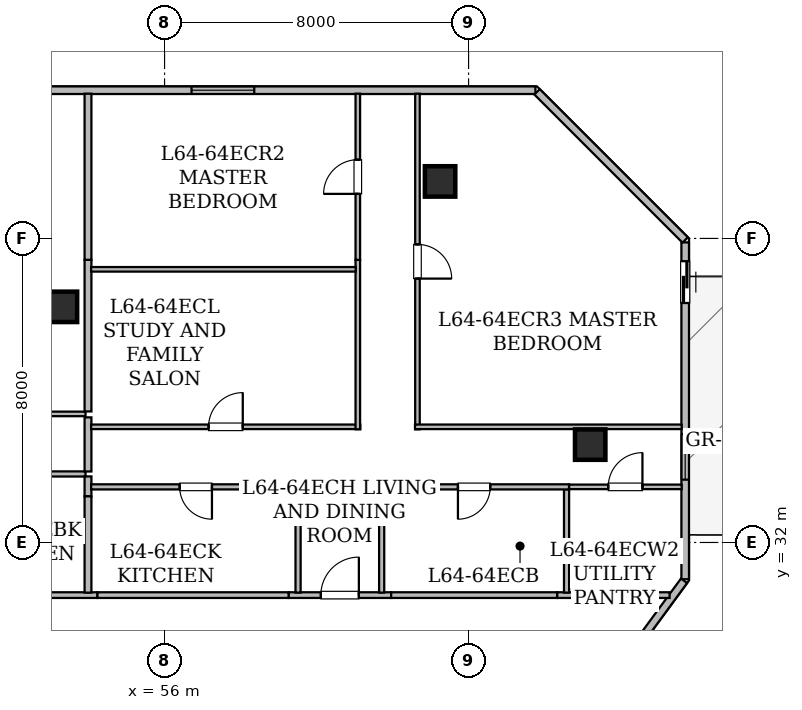
"""IFC4 building model, lengths in metres.
Left out: names, types, materials, properties, quantities, classifications, styles, units other than length and angle.
Written with IfcOpenShell. Run it as: python <this file> out.ifc"""

import sys

from ifc_helpers import new_model, si_unit, direction, frame, frame_2d, origin, origin_2d, place, context, subcontext, project, spatial, rectangle, hollow_rectangle, extrude, element, fill, save


model = new_model("IFC4")
c1 = context("Model", 3, precision=1e-05, world=origin(), true_north=direction((0.0, 1.0)))
c2 = subcontext(c1, "Body", "Model", "MODEL_VIEW")
j1 = project(units=[si_unit("LENGTHUNIT", "METRE"), si_unit("PLANEANGLEUNIT", "RADIAN")], contexts=[c1])
p1 = place(None, origin())
s1 = spatial("IfcSite", under=j1, at=p1, CompositionType="ELEMENT")
p2 = place(p1, origin())
s2 = spatial("IfcBuilding", under=s1, at=p2, CompositionType="ELEMENT")
p3 = place(p2, frame((0.0, 0.0, 250.05)))
s3 = spatial("IfcBuildingStorey", under=s2, at=p3, CompositionType="ELEMENT", Elevation=250.05)
for number, where, z_axis, x_axis in (
    (1, (63.25, 41.5, 0.0), (0.0, 0.0, 1.0), (1.0, 0.0, 0.0)),
    (2, (67.2, 34.575, 0.0), (0.0, 0.0, 1.0), (1.0, 0.0, 0.0)),
    (3, (53.3, 38.2, 0.0), (0.0, 0.0, 1.0), (1.0, 0.0, 0.0)),
):
    element("IfcColumn", number, at=place(p3, frame(where, z_axis=z_axis, x_axis=x_axis)), inside=s3, PredefinedType="COLUMN", context=c2, shape_type="SweptSolid", body=[
        extrude(hollow_rectangle(XDim=0.8, YDim=0.8, WallThickness=0.04, at=origin_2d()), origin(), (0.0, 0.0, 1.0), 3.65),
    ])
p4 = place(p3, frame((24.302, 43.9, 0.0), z_axis=(0.0, 0.0, 1.0), x_axis=(1.0, 0.0, 0.0)))
e4 = element("IfcWall", 4, at=p4, inside=s3, PredefinedType="STANDARD", context=c2, shape_type="SweptSolid", body=[
    extrude(rectangle(XDim=41.457, YDim=0.2, at=frame_2d((20.729, 0.0))), origin(), (0.0, 0.0, 1.0), 3.43),
])
p5 = place(p4, frame((0.604, 0.0, 0.85)))
e5 = element("IfcOpeningElement", 5, at=p5, cuts=e4, PredefinedType="OPENING", context=c2, shape_type="SweptSolid", body=[
    extrude(rectangle(XDim=1.65, YDim=1.55, at=frame_2d((0.825, 0.775))), frame((0.0, 0.11, 0.0), z_axis=(0.0, -1.0, 0.0), x_axis=(1.0, 0.0, 0.0)), (0.0, 0.0, 1.0), 0.22),
])
p6 = place(p4, frame((9.098, 0.0, 0.85)))
e6 = element("IfcOpeningElement", 6, at=p6, cuts=e4, PredefinedType="OPENING", context=c2, shape_type="SweptSolid", body=[
    extrude(rectangle(XDim=1.65, YDim=1.55, at=frame_2d((0.825, 0.775))), frame((0.0, 0.11, 0.0), z_axis=(0.0, -1.0, 0.0), x_axis=(1.0, 0.0, 0.0)), (0.0, 0.0, 1.0), 0.22),
])
p7 = place(p4, frame((14.405, 0.0, 0.85)))
e7 = element("IfcOpeningElement", 7, at=p7, cuts=e4, PredefinedType="OPENING", context=c2, shape_type="SweptSolid", body=[
    extrude(rectangle(XDim=1.65, YDim=1.55, at=frame_2d((0.825, 0.775))), frame((0.0, 0.11, 0.0), z_axis=(0.0, -1.0, 0.0), x_axis=(1.0, 0.0, 0.0)), (0.0, 0.0, 1.0), 0.22),
])
p8 = place(p4, frame((22.898, 0.0, 0.8)))
e8 = element("IfcOpeningElement", 8, at=p8, cuts=e4, PredefinedType="OPENING", context=c2, shape_type="SweptSolid", body=[
    extrude(rectangle(XDim=1.2, YDim=1.5, at=frame_2d((0.6, 0.75))), frame((0.0, 0.11, 0.0), z_axis=(0.0, -1.0, 0.0), x_axis=(1.0, 0.0, 0.0)), (0.0, 0.0, 1.0), 0.22),
])
p9 = place(p4, frame((19.188, 0.0, 0.85)))
e9 = element("IfcOpeningElement", 9, at=p9, cuts=e4, PredefinedType="OPENING", context=c2, shape_type="SweptSolid", body=[
    extrude(rectangle(XDim=1.65, YDim=1.55, at=frame_2d((0.825, 0.775))), frame((0.0, 0.11, 0.0), z_axis=(0.0, -1.0, 0.0), x_axis=(1.0, 0.0, 0.0)), (0.0, 0.0, 1.0), 0.22),
])
p10 = place(p4, frame((26.158, 0.0, 0.85)))
e10 = element("IfcOpeningElement", 10, at=p10, cuts=e4, PredefinedType="OPENING", context=c2, shape_type="SweptSolid", body=[
    extrude(rectangle(XDim=1.65, YDim=1.55, at=frame_2d((0.825, 0.775))), frame((0.0, 0.11, 0.0), z_axis=(0.0, -1.0, 0.0), x_axis=(1.0, 0.0, 0.0)), (0.0, 0.0, 1.0), 0.22),
])
p11 = place(p4, frame((32.408, 0.0, 0.85)))
e11 = element("IfcOpeningElement", 11, at=p11, cuts=e4, PredefinedType="OPENING", context=c2, shape_type="SweptSolid", body=[
    extrude(rectangle(XDim=1.65, YDim=1.55, at=frame_2d((0.825, 0.775))), frame((0.0, 0.11, 0.0), z_axis=(0.0, -1.0, 0.0), x_axis=(1.0, 0.0, 0.0)), (0.0, 0.0, 1.0), 0.22),
])
p12 = place(p3, frame((65.802, 43.857, 0.0), z_axis=(0.0, 0.0, 1.0), x_axis=(0.707106781187, -0.707106781187, 0.0)))
e12 = element("IfcWall", 12, at=p12, inside=s3, PredefinedType="STANDARD", context=c2, shape_type="SweptSolid", body=[
    extrude(rectangle(XDim=5.512, YDim=0.2, at=frame_2d((2.756, 0.0))), origin(), (0.0, 0.0, 1.0), 3.43),
])
p13 = place(p3, frame((69.7, 39.896, 0.0), z_axis=(0.0, 0.0, 1.0), x_axis=(0.0, -1.0, 0.0)))
e13 = element("IfcWall", 13, at=p13, inside=s3, PredefinedType="STANDARD", context=c2, shape_type="SweptSolid", body=[
    extrude(rectangle(XDim=8.863, YDim=0.2, at=frame_2d((4.432, 0.0))), origin(), (0.0, 0.0, 1.0), 3.43),
])
p14 = place(p13, frame((0.495, 0.0, 0.0)))
e14 = element("IfcOpeningElement", 14, at=p14, cuts=e13, PredefinedType="OPENING", context=c2, shape_type="SweptSolid", body=[
    extrude(rectangle(XDim=1.1, YDim=2.2, at=frame_2d((0.55, 1.1))), frame((0.0, 0.11, 0.0), z_axis=(0.0, -1.0, 0.0), x_axis=(1.0, 0.0, 0.0)), (0.0, 0.0, 1.0), 0.22),
])
p15 = place(p13, frame((5.043, 0.0, 0.8)))
e15 = element("IfcOpeningElement", 15, at=p15, cuts=e13, PredefinedType="OPENING", context=c2, shape_type="SweptSolid", body=[
    extrude(rectangle(XDim=1.2, YDim=1.5, at=frame_2d((0.6, 0.75))), frame((0.0, 0.11, 0.0), z_axis=(0.0, -1.0, 0.0), x_axis=(1.0, 0.0, 0.0)), (0.0, 0.0, 1.0), 0.22),
])
p16 = place(p3, frame((69.67, 30.992, 0.0), z_axis=(0.0, 0.0, 1.0), x_axis=(-0.591320870733, -0.806436375566, 0.0)))
e16 = element("IfcWall", 16, at=p16, inside=s3, PredefinedType="STANDARD", context=c2, shape_type="SweptSolid", body=[
    extrude(rectangle(XDim=3.71, YDim=0.2, at=frame_2d((1.855, 0.0))), origin(), (0.0, 0.0, 1.0), 3.43),
])
p17 = place(p3, frame((49.149, 30.615, 0.0), z_axis=(0.0, 0.0, 1.0), x_axis=(1.0, 0.0, 0.0)))
e17 = element("IfcWall", 17, at=p17, inside=s3, PredefinedType="STANDARD", context=c2, shape_type="SweptSolid", body=[
    extrude(rectangle(XDim=5.085, YDim=0.15, at=frame_2d((2.542, 0.0))), origin(), (0.0, 0.0, 1.0), 2.725),
])
p18 = place(p3, frame((66.329, 30.615, 0.0), z_axis=(0.0, 0.0, 1.0), x_axis=(1.0, 0.0, 0.0)))
e18 = element("IfcWall", 18, at=p18, inside=s3, PredefinedType="STANDARD", context=c2, shape_type="SweptSolid", body=[
    extrude(rectangle(XDim=2.961, YDim=0.15, at=frame_2d((1.48, 0.0))), origin(), (0.0, 0.0, 1.0), 2.887),
])
p19 = place(p3, frame((59.264, 30.615, 0.0), z_axis=(0.0, 0.0, 1.0), x_axis=(1.0, 0.0, 0.0)))
e19 = element("IfcWall", 19, at=p19, inside=s3, PredefinedType="STANDARD", context=c2, shape_type="SweptSolid", body=[
    extrude(rectangle(XDim=2.698, YDim=0.15, at=frame_2d((1.349, 0.0))), origin(), (0.0, 0.0, 1.0), 3.43),
])
p20 = place(p19, frame((0.849, 0.0, 0.0)))
e20 = element("IfcOpeningElement", 20, at=p20, cuts=e19, PredefinedType="OPENING", context=c2, shape_type="SweptSolid", body=[
    extrude(rectangle(XDim=1.0, YDim=2.15, at=frame_2d((0.5, 1.075))), frame((0.0, 0.085, 0.0), z_axis=(0.0, -1.0, 0.0), x_axis=(1.0, 0.0, 0.0)), (0.0, 0.0, 1.0), 0.17),
])
p21 = place(p3, frame((61.962, 30.615, 0.0), z_axis=(0.0, 0.0, 1.0), x_axis=(1.0, 0.0, 0.0)))
e21 = element("IfcWall", 21, at=p21, inside=s3, PredefinedType="STANDARD", context=c2, shape_type="SweptSolid", body=[
    extrude(rectangle(XDim=4.367, YDim=0.15, at=frame_2d((2.184, 0.0))), origin(), (0.0, 0.0, 1.0), 3.43),
])
p22 = place(p3, frame((54.234, 30.615, 0.0), z_axis=(0.0, 0.0, 1.0), x_axis=(1.0, 0.0, 0.0)))
e22 = element("IfcWall", 22, at=p22, inside=s3, PredefinedType="STANDARD", context=c2, shape_type="SweptSolid", body=[
    extrude(rectangle(XDim=5.03, YDim=0.15, at=frame_2d((2.515, 0.0))), origin(), (0.0, 0.0, 1.0), 3.43),
])
p23 = place(p3, frame((53.92, 33.803, 0.0), z_axis=(0.0, 0.0, 1.0), x_axis=(-1.0, 0.0, 0.0)))
e23 = element("IfcWall", 23, at=p23, inside=s3, PredefinedType="PARTITIONING", context=c2, shape_type="SweptSolid", body=[
    extrude(rectangle(XDim=5.085, YDim=0.135, at=frame_2d((2.542, 0.0))), origin(), (0.0, 0.0, 1.0), 2.725),
])
p24 = place(p23, frame((2.118, 0.0, 0.0)))
e24 = element("IfcOpeningElement", 24, at=p24, cuts=e23, PredefinedType="OPENING", context=c2, shape_type="SweptSolid", body=[
    extrude(rectangle(XDim=0.85, YDim=2.1, at=frame_2d((0.425, 1.05))), frame((0.0, 0.077, 0.0), z_axis=(0.0, -1.0, 0.0), x_axis=(1.0, 0.0, 0.0)), (0.0, 0.0, 1.0), 0.155),
])
p25 = place(p3, frame((48.52, 35.383, 0.0), z_axis=(0.0, 0.0, 1.0), x_axis=(1.0, 0.0, 0.0)))
e25 = element("IfcWall", 25, at=p25, inside=s3, PredefinedType="PARTITIONING", context=c2, shape_type="SweptSolid", body=[
    extrude(rectangle(XDim=5.4, YDim=0.12, at=frame_2d((2.7, 0.0))), origin(), (0.0, 0.0, 1.0), 2.725),
])
p26 = place(p3, frame((53.985, 35.292, 0.0), z_axis=(0.0, 0.0, 1.0), x_axis=(0.0, -1.0, 0.0)))
e26 = element("IfcWall", 26, at=p26, inside=s3, PredefinedType="STANDARD", context=c2, shape_type="SweptSolid", body=[
    extrude(rectangle(XDim=1.424, YDim=0.18, at=frame_2d((0.712, 0.0))), origin(), (0.0, 0.0, 1.0), 3.43),
])
p27 = place(p3, frame((53.985, 33.738, 0.0), z_axis=(0.0, 0.0, 1.0), x_axis=(0.0, -1.0, 0.0)))
e27 = element("IfcWall", 27, at=p27, inside=s3, PredefinedType="STANDARD", context=c2, shape_type="SweptSolid", body=[
    extrude(rectangle(XDim=0.524, YDim=0.18, at=frame_2d((0.262, 0.0))), origin(), (0.0, 0.0, 1.0), 2.961),
])
p28 = place(p3, frame((53.985, 33.214, 0.0), z_axis=(0.0, 0.0, 1.0), x_axis=(0.0, -1.0, 0.0)))
e28 = element("IfcWall", 28, at=p28, inside=s3, PredefinedType="STANDARD", context=c2, shape_type="SweptSolid", body=[
    extrude(rectangle(XDim=2.534, YDim=0.18, at=frame_2d((1.267, 0.0))), origin(), (0.0, 0.0, 1.0), 3.43),
])
p29 = place(p3, frame((53.985, 39.436, 0.0), z_axis=(0.0, 0.0, 1.0), x_axis=(0.0, -1.0, 0.0)))
e29 = element("IfcWall", 29, at=p29, inside=s3, PredefinedType="STANDARD", context=c2, shape_type="SweptSolid", body=[
    extrude(rectangle(XDim=3.988, YDim=0.18, at=frame_2d((1.994, 0.0))), origin(), (0.0, 0.0, 1.0), 2.725),
])
p30 = place(p3, frame((53.985, 43.808, 0.0), z_axis=(0.0, 0.0, 1.0), x_axis=(0.0, -1.0, 0.0)))
e30 = element("IfcWall", 30, at=p30, inside=s3, PredefinedType="STANDARD", context=c2, shape_type="SweptSolid", body=[
    extrude(rectangle(XDim=4.372, YDim=0.18, at=frame_2d((2.186, 0.0))), origin(), (0.0, 0.0, 1.0), 2.887),
])
p31 = place(p3, frame((66.643, 33.463, 0.0), z_axis=(0.0, 0.0, 1.0), x_axis=(1.0, 0.0, 0.0)))
e31 = element("IfcWall", 31, at=p31, inside=s3, PredefinedType="PARTITIONING", context=c2, shape_type="SweptSolid", body=[
    extrude(rectangle(XDim=2.965, YDim=0.12, at=frame_2d((1.482, 0.0))), origin(), (0.0, 0.0, 1.0), 2.887),
])
p32 = place(p31, frame((1.032, 0.0, 0.0)))
e32 = element("IfcOpeningElement", 32, at=p32, cuts=e31, PredefinedType="OPENING", context=c2, shape_type="SweptSolid", body=[
    extrude(rectangle(XDim=0.9, YDim=2.1, at=frame_2d((0.45, 1.05))), frame((0.0, 0.07, 0.0), z_axis=(0.0, -1.0, 0.0), x_axis=(1.0, 0.0, 0.0)), (0.0, 0.0, 1.0), 0.14),
])
p33 = place(p3, frame((66.578, 30.68, 0.0), z_axis=(0.0, 0.0, 1.0), x_axis=(0.0, 1.0, 0.0)))
e33 = element("IfcWall", 33, at=p33, inside=s3, PredefinedType="PARTITIONING", context=c2, shape_type="SweptSolid", body=[
    extrude(rectangle(XDim=2.718, YDim=0.135, at=frame_2d((1.359, 0.0))), origin(), (0.0, 0.0, 1.0), 2.961),
])
p34 = place(p3, frame((66.643, 33.463, 0.0), z_axis=(0.0, 0.0, 1.0), x_axis=(-1.0, 0.0, 0.0)))
e34 = element("IfcWall", 34, at=p34, inside=s3, PredefinedType="PARTITIONING", context=c2, shape_type="SweptSolid", body=[
    extrude(rectangle(XDim=4.995, YDim=0.135, at=frame_2d((2.498, 0.0))), origin(), (0.0, 0.0, 1.0), 2.961),
])
p35 = place(p34, frame((2.073, 0.0, 0.0)))
e35 = element("IfcOpeningElement", 35, at=p35, cuts=e34, PredefinedType="OPENING", context=c2, shape_type="SweptSolid", body=[
    extrude(rectangle(XDim=0.85, YDim=2.1, at=frame_2d((0.425, 1.05))), frame((0.0, 0.077, 0.0), z_axis=(0.0, -1.0, 0.0), x_axis=(1.0, 0.0, 0.0)), (0.0, 0.0, 1.0), 0.155),
])
for number, where, z_axis, x_axis in (
    (36, (61.713, 33.528, 0.0), (0.0, 0.0, 1.0), (0.0, -1.0, 0.0)),
    (37, (59.513, 30.68, 0.0), (0.0, 0.0, 1.0), (0.0, 1.0, 0.0)),
):
    element("IfcWall", number, at=place(p3, frame(where, z_axis=z_axis, x_axis=x_axis)), inside=s3, PredefinedType="PARTITIONING", context=c2, shape_type="SweptSolid", body=[
        extrude(rectangle(XDim=2.848, YDim=0.135, at=frame_2d((1.424, 0.0))), origin(), (0.0, 0.0, 1.0), 2.961),
    ])
p36 = place(p3, frame((59.578, 33.463, 0.0), z_axis=(0.0, 0.0, 1.0), x_axis=(-1.0, 0.0, 0.0)))
e38 = element("IfcWall", 38, at=p36, inside=s3, PredefinedType="PARTITIONING", context=c2, shape_type="SweptSolid", body=[
    extrude(rectangle(XDim=5.511, YDim=0.135, at=frame_2d((2.755, 0.0))), origin(), (0.0, 0.0, 1.0), 2.961),
])
p37 = place(p36, frame((2.331, 0.0, 0.0)))
e39 = element("IfcOpeningElement", 39, at=p37, cuts=e38, PredefinedType="OPENING", context=c2, shape_type="SweptSolid", body=[
    extrude(rectangle(XDim=0.85, YDim=2.1, at=frame_2d((0.425, 1.05))), frame((0.0, 0.077, 0.0), z_axis=(0.0, -1.0, 0.0), x_axis=(1.0, 0.0, 0.0)), (0.0, 0.0, 1.0), 0.155),
])
p38 = place(p3, frame((54.067, 35.043, 0.0), z_axis=(0.0, 0.0, 1.0), x_axis=(1.0, 0.0, 0.0)))
e40 = element("IfcWall", 40, at=p38, inside=s3, PredefinedType="PARTITIONING", context=c2, shape_type="SweptSolid", body=[
    extrude(rectangle(XDim=7.083, YDim=0.12, at=frame_2d((3.542, 0.0))), origin(), (0.0, 0.0, 1.0), 3.43),
])
p39 = place(p38, frame((3.091, 0.0, 0.0)))
e41 = element("IfcOpeningElement", 41, at=p39, cuts=e40, PredefinedType="OPENING", context=c2, shape_type="SweptSolid", body=[
    extrude(rectangle(XDim=0.9, YDim=2.1, at=frame_2d((0.45, 1.05))), frame((0.0, 0.07, 0.0), z_axis=(0.0, -1.0, 0.0), x_axis=(1.0, 0.0, 0.0)), (0.0, 0.0, 1.0), 0.14),
])
p40 = place(p3, frame((61.085, 34.978, 0.0), z_axis=(0.0, 0.0, 1.0), x_axis=(0.0, 1.0, 0.0)))
e42 = element("IfcWall", 42, at=p40, inside=s3, PredefinedType="PARTITIONING", context=c2, shape_type="SweptSolid", body=[
    extrude(rectangle(XDim=4.458, YDim=0.12, at=frame_2d((2.229, 0.0))), origin(), (0.0, 0.0, 1.0), 2.725),
])
p41 = place(p3, frame((61.085, 39.436, 0.0), z_axis=(0.0, 0.0, 1.0), x_axis=(0.0, 1.0, 0.0)))
e43 = element("IfcWall", 43, at=p41, inside=s3, PredefinedType="PARTITIONING", context=c2, shape_type="SweptSolid", body=[
    extrude(rectangle(XDim=4.372, YDim=0.12, at=frame_2d((2.186, 0.0))), origin(), (0.0, 0.0, 1.0), 2.725),
])
p42 = place(p41, frame((1.736, 0.0, 0.0)))
e44 = element("IfcOpeningElement", 44, at=p42, cuts=e43, PredefinedType="OPENING", context=c2, shape_type="SweptSolid", body=[
    extrude(rectangle(XDim=0.9, YDim=2.1, at=frame_2d((0.45, 1.05))), frame((0.0, 0.07, 0.0), z_axis=(0.0, -1.0, 0.0), x_axis=(1.0, 0.0, 0.0)), (0.0, 0.0, 1.0), 0.14),
])
p43 = place(p3, frame((62.655, 43.808, 0.0), z_axis=(0.0, 0.0, 1.0), x_axis=(0.0, -1.0, 0.0)))
e45 = element("IfcWall", 45, at=p43, inside=s3, PredefinedType="PARTITIONING", context=c2, shape_type="SweptSolid", body=[
    extrude(rectangle(XDim=8.83, YDim=0.12, at=frame_2d((4.415, 0.0))), origin(), (0.0, 0.0, 1.0), 2.725),
])
p44 = place(p43, frame((3.965, 0.0, 0.0)))
e46 = element("IfcOpeningElement", 46, at=p44, cuts=e45, PredefinedType="OPENING", context=c2, shape_type="SweptSolid", body=[
    extrude(rectangle(XDim=0.9, YDim=2.1, at=frame_2d((0.45, 1.05))), frame((0.0, 0.07, 0.0), z_axis=(0.0, -1.0, 0.0), x_axis=(1.0, 0.0, 0.0)), (0.0, 0.0, 1.0), 0.14),
])
p45 = place(p3, frame((62.59, 35.043, 0.0), z_axis=(0.0, 0.0, 1.0), x_axis=(1.0, 0.0, 0.0)))
e47 = element("IfcWall", 47, at=p45, inside=s3, PredefinedType="PARTITIONING", context=c2, shape_type="SweptSolid", body=[
    extrude(rectangle(XDim=7.018, YDim=0.12, at=frame_2d((3.509, 0.0))), origin(), (0.0, 0.0, 1.0), 2.725),
])
p46 = place(p3, frame((54.067, 39.187, 0.0), z_axis=(0.0, 0.0, 1.0), x_axis=(1.0, 0.0, 0.0)))
e48 = element("IfcWall", 48, at=p46, inside=s3, PredefinedType="PARTITIONING", context=c2, shape_type="SweptSolid", body=[
    extrude(rectangle(XDim=6.964, YDim=0.12, at=frame_2d((3.482, 0.0))), origin(), (0.0, 0.0, 1.0), 2.725),
])
p47 = place(p14, origin())
e49 = element("IfcDoor", 49, at=p47, inside=s3, OperationType="SLIDING_TO_LEFT", PredefinedType="DOOR", context=c2, shape_type="SweptSolid", body=[
    extrude(rectangle(XDim=1.1, YDim=2.2, at=frame_2d((0.55, 1.1))), frame((0.0, 0.025, 0.0), z_axis=(0.0, -1.0, 0.0), x_axis=(1.0, 0.0, 0.0)), (0.0, 0.0, 1.0), 0.05),
])
fill(e14, e49)
p48 = place(p15, origin())
e50 = element("IfcWindow", 50, at=p48, inside=s3, PartitioningType="SINGLE_PANEL", PredefinedType="WINDOW", context=c2, shape_type="SweptSolid", body=[
    extrude(rectangle(XDim=1.2, YDim=1.5, at=frame_2d((0.6, 0.75))), frame((0.0, 0.03, 0.0), z_axis=(0.0, -1.0, 0.0), x_axis=(1.0, 0.0, 0.0)), (0.0, 0.0, 1.0), 0.06),
])
fill(e15, e50)
p49 = place(p11, origin())
e51 = element("IfcWindow", 51, at=p49, inside=s3, PartitioningType="SINGLE_PANEL", PredefinedType="WINDOW", context=c2, shape_type="SweptSolid", body=[
    extrude(rectangle(XDim=1.65, YDim=1.55, at=frame_2d((0.825, 0.775))), frame((0.0, 0.03, 0.0), z_axis=(0.0, -1.0, 0.0), x_axis=(1.0, 0.0, 0.0)), (0.0, 0.0, 1.0), 0.06),
])
fill(e11, e51)
p50 = place(p20, origin())
e52 = element("IfcDoor", 52, at=p50, inside=s3, OperationType="SINGLE_SWING_RIGHT", PredefinedType="DOOR", context=c2, shape_type="SweptSolid", body=[
    extrude(rectangle(XDim=1.0, YDim=2.15, at=frame_2d((0.5, 1.075))), frame((0.0, 0.025, 0.0), z_axis=(0.0, -1.0, 0.0), x_axis=(1.0, 0.0, 0.0)), (0.0, 0.0, 1.0), 0.05),
])
fill(e20, e52)
p51 = place(p32, origin())
e53 = element("IfcDoor", 53, at=p51, inside=s3, OperationType="SINGLE_SWING_RIGHT", PredefinedType="DOOR", context=c2, shape_type="SweptSolid", body=[
    extrude(rectangle(XDim=0.9, YDim=2.1, at=frame_2d((0.45, 1.05))), frame((0.0, 0.025, 0.0), z_axis=(0.0, -1.0, 0.0), x_axis=(1.0, 0.0, 0.0)), (0.0, 0.0, 1.0), 0.05),
])
fill(e32, e53)
p52 = place(p35, origin())
e54 = element("IfcDoor", 54, at=p52, inside=s3, OperationType="SINGLE_SWING_RIGHT", PredefinedType="DOOR", context=c2, shape_type="SweptSolid", body=[
    extrude(rectangle(XDim=0.85, YDim=2.1, at=frame_2d((0.425, 1.05))), frame((0.0, 0.025, 0.0), z_axis=(0.0, -1.0, 0.0), x_axis=(1.0, 0.0, 0.0)), (0.0, 0.0, 1.0), 0.05),
])
fill(e35, e54)
p53 = place(p37, origin())
e55 = element("IfcDoor", 55, at=p53, inside=s3, OperationType="SINGLE_SWING_LEFT", PredefinedType="DOOR", context=c2, shape_type="SweptSolid", body=[
    extrude(rectangle(XDim=0.85, YDim=2.1, at=frame_2d((0.425, 1.05))), frame((0.0, 0.025, 0.0), z_axis=(0.0, -1.0, 0.0), x_axis=(1.0, 0.0, 0.0)), (0.0, 0.0, 1.0), 0.05),
])
fill(e39, e55)
p54 = place(p39, origin())
e56 = element("IfcDoor", 56, at=p54, inside=s3, OperationType="SINGLE_SWING_RIGHT", PredefinedType="DOOR", context=c2, shape_type="SweptSolid", body=[
    extrude(rectangle(XDim=0.9, YDim=2.1, at=frame_2d((0.45, 1.05))), frame((0.0, 0.025, 0.0), z_axis=(0.0, -1.0, 0.0), x_axis=(1.0, 0.0, 0.0)), (0.0, 0.0, 1.0), 0.05),
])
fill(e41, e56)
p55 = place(p42, origin())
e57 = element("IfcDoor", 57, at=p55, inside=s3, OperationType="SINGLE_SWING_LEFT", PredefinedType="DOOR", context=c2, shape_type="SweptSolid", body=[
    extrude(rectangle(XDim=0.9, YDim=2.1, at=frame_2d((0.45, 1.05))), frame((0.0, 0.025, 0.0), z_axis=(0.0, -1.0, 0.0), x_axis=(1.0, 0.0, 0.0)), (0.0, 0.0, 1.0), 0.05),
])
fill(e44, e57)
p56 = place(p44, origin())
e58 = element("IfcDoor", 58, at=p56, inside=s3, OperationType="SINGLE_SWING_RIGHT", PredefinedType="DOOR", context=c2, shape_type="SweptSolid", body=[
    extrude(rectangle(XDim=0.9, YDim=2.1, at=frame_2d((0.45, 1.05))), frame((0.0, 0.025, 0.0), z_axis=(0.0, -1.0, 0.0), x_axis=(1.0, 0.0, 0.0)), (0.0, 0.0, 1.0), 0.05),
])
fill(e46, e58)
save(model, sys.argv[1])
